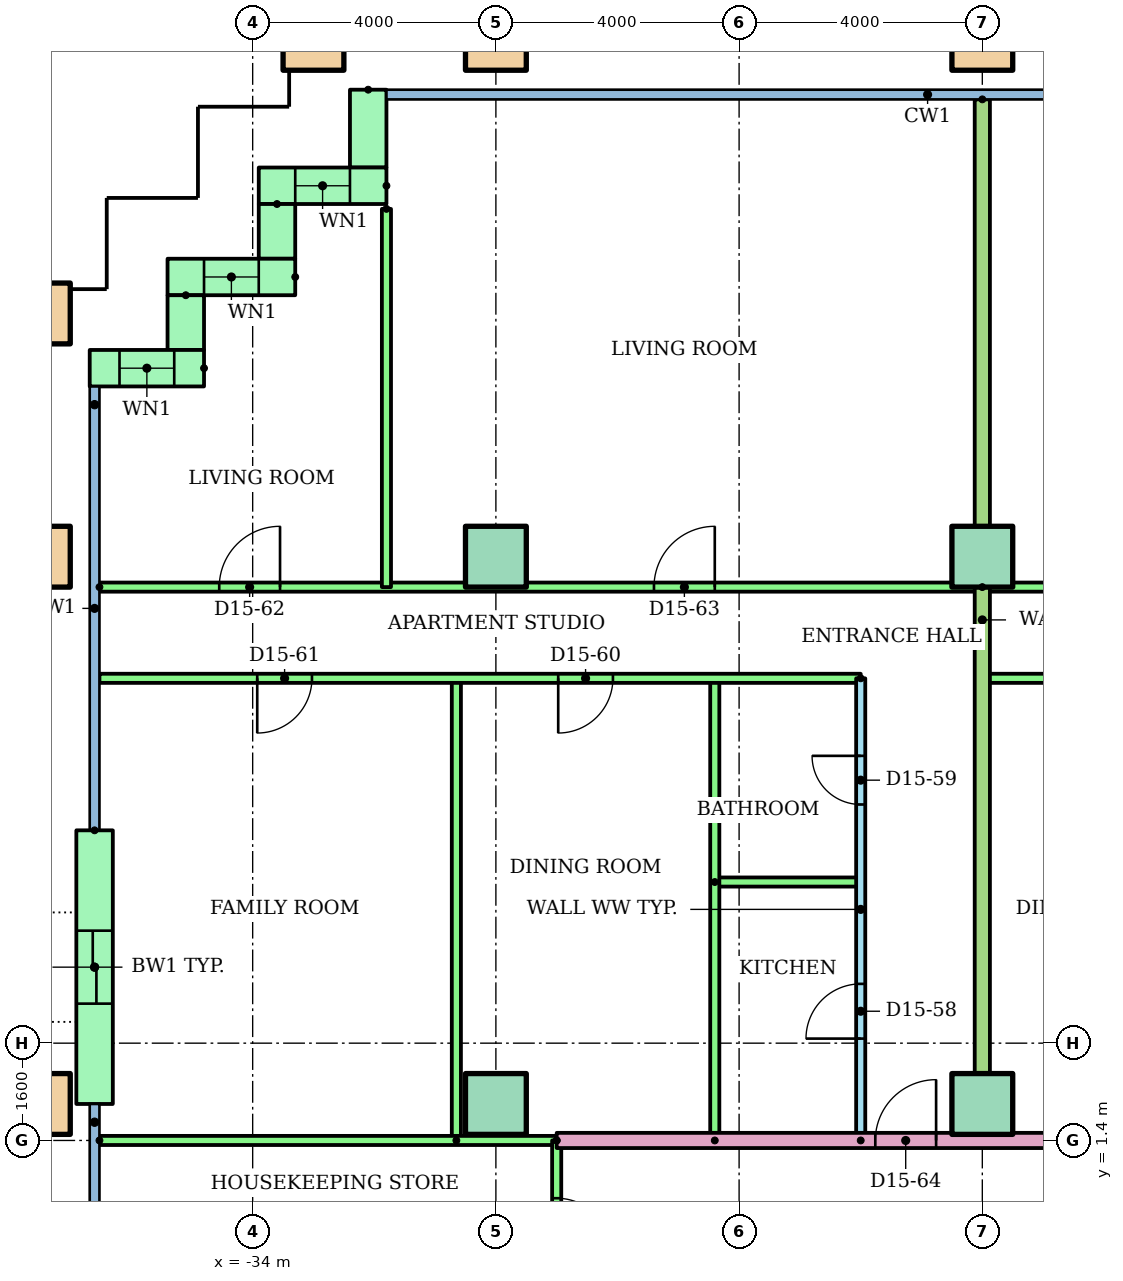
"""IFC4 building model, lengths in metres.
Left out: names, types, materials, properties, quantities, classifications, styles, units other than length and angle.
Written with IfcOpenShell. Run it as: python <this file> out.ifc"""

import sys

from ifc_helpers import new_model, si_unit, direction, frame, frame_2d, origin, origin_2d, place, context, subcontext, project, spatial, rectangle, hollow_rectangle, extrude, element, fill, save


model = new_model("IFC4")
c1 = context("Model", 3, precision=1e-05, world=origin(), true_north=direction((0.0, 1.0)))
c2 = subcontext(c1, "Body", "Model", "MODEL_VIEW")
j1 = project(units=[si_unit("LENGTHUNIT", "METRE"), si_unit("PLANEANGLEUNIT", "RADIAN")], contexts=[c1])
p1 = place(None, origin())
s1 = spatial("IfcSite", under=j1, at=p1, CompositionType="ELEMENT")
p2 = place(p1, origin())
s2 = spatial("IfcBuilding", under=s1, at=p2, CompositionType="ELEMENT")
p3 = place(p2, frame((0.0, 0.0, 57.6)))
s3 = spatial("IfcBuildingStorey", under=s2, at=p3, CompositionType="ELEMENT", Elevation=57.6)
p4 = place(p3, frame((-37.5, 2.0, 0.0)))
e1 = element("IfcColumn", 1, at=p4, inside=s3, PredefinedType="COLUMN", context=c2, shape_type="SweptSolid", body=[
    extrude(hollow_rectangle(XDim=1.0, YDim=1.0, WallThickness=0.05, at=origin_2d()), origin(), (0.0, 0.0, 1.0), 3.2),
])
for number, where in (
    (2, (-30.0, 2.0, 0.0)),
    (3, (-22.0, 2.0, 0.0)),
):
    element("IfcColumn", number, at=place(p3, frame(where)), inside=s3, PredefinedType="COLUMN", context=c2, shape_type="SweptSolid", body=[
        extrude(rectangle(XDim=1.0, YDim=1.0, at=origin_2d()), origin(), (0.0, 0.0, 1.0), 3.2),
    ])
p5 = place(p3, frame((-37.5, 11.0, 0.0)))
e4 = element("IfcColumn", 4, at=p5, inside=s3, PredefinedType="COLUMN", context=c2, shape_type="SweptSolid", body=[
    extrude(hollow_rectangle(XDim=1.0, YDim=1.0, WallThickness=0.05, at=origin_2d()), origin(), (0.0, 0.0, 1.0), 3.2),
])
for number, where in (
    (5, (-30.0, 11.0, 0.0)),
    (6, (-22.0, 11.0, 0.0)),
):
    element("IfcColumn", number, at=place(p3, frame(where)), inside=s3, PredefinedType="COLUMN", context=c2, shape_type="SweptSolid", body=[
        extrude(rectangle(XDim=1.0, YDim=1.0, at=origin_2d()), origin(), (0.0, 0.0, 1.0), 3.2),
    ])
for number, where in (
    (7, (-37.5, 15.0, 0.0)),
    (8, (-33.0, 19.5, 0.0)),
    (9, (-30.0, 19.5, 0.0)),
    (10, (-22.0, 19.5, 0.0)),
):
    element("IfcColumn", number, at=place(p3, frame(where)), inside=s3, PredefinedType="COLUMN", context=c2, shape_type="SweptSolid", body=[
        extrude(hollow_rectangle(XDim=1.0, YDim=1.0, WallThickness=0.05, at=origin_2d()), origin(), (0.0, 0.0, 1.0), 3.2),
    ])
p6 = place(p3, frame((-32.1, 18.68, 0.0), z_axis=(0.0, 0.0, 1.0), x_axis=(0.0, -1.0, 0.0)))
e11 = element("IfcWall", 11, at=p6, inside=s3, PredefinedType="STANDARD", context=c2, shape_type="SweptSolid", body=[
    extrude(rectangle(XDim=1.28, YDim=0.6, at=frame_2d((0.64, 0.0))), origin(), (0.0, 0.0, 1.0), 2.92),
])
p7 = place(p3, frame((-31.8, 17.1, 0.0), z_axis=(0.0, 0.0, 1.0), x_axis=(-1.0, 0.0, 0.0)))
e12 = element("IfcWall", 12, at=p7, inside=s3, PredefinedType="STANDARD", context=c2, shape_type="SweptSolid", body=[
    extrude(rectangle(XDim=2.1, YDim=0.6, at=frame_2d((1.05, 0.0))), origin(), (0.0, 0.0, 1.0), 2.92),
])
p8 = place(p7, frame((0.6, 0.0, 0.9)))
e13 = element("IfcOpeningElement", 13, at=p8, cuts=e12, PredefinedType="OPENING", context=c2, shape_type="SweptSolid", body=[
    extrude(rectangle(XDim=0.9, YDim=1.5, at=frame_2d((0.45, 0.75))), frame((0.0, 0.31, 0.0), z_axis=(0.0, -1.0, 0.0), x_axis=(1.0, 0.0, 0.0)), (0.0, 0.0, 1.0), 0.62),
])
p9 = place(p3, frame((-33.6, 16.8, 0.0), z_axis=(0.0, 0.0, 1.0), x_axis=(0.0, -1.0, 0.0)))
e14 = element("IfcWall", 14, at=p9, inside=s3, PredefinedType="STANDARD", context=c2, shape_type="SweptSolid", body=[
    extrude(rectangle(XDim=0.9, YDim=0.6, at=frame_2d((0.45, 0.0))), origin(), (0.0, 0.0, 1.0), 2.92),
])
p10 = place(p3, frame((-33.3, 15.6, 0.0), z_axis=(0.0, 0.0, 1.0), x_axis=(-1.0, 0.0, 0.0)))
e15 = element("IfcWall", 15, at=p10, inside=s3, PredefinedType="STANDARD", context=c2, shape_type="SweptSolid", body=[
    extrude(rectangle(XDim=2.1, YDim=0.6, at=frame_2d((1.05, 0.0))), origin(), (0.0, 0.0, 1.0), 2.92),
])
p11 = place(p10, frame((0.6, 0.0, 0.9)))
e16 = element("IfcOpeningElement", 16, at=p11, cuts=e15, PredefinedType="OPENING", context=c2, shape_type="SweptSolid", body=[
    extrude(rectangle(XDim=0.9, YDim=1.5, at=frame_2d((0.45, 0.75))), frame((0.0, 0.31, 0.0), z_axis=(0.0, -1.0, 0.0), x_axis=(1.0, 0.0, 0.0)), (0.0, 0.0, 1.0), 0.62),
])
p12 = place(p3, frame((-35.1, 15.3, 0.0), z_axis=(0.0, 0.0, 1.0), x_axis=(0.0, -1.0, 0.0)))
e17 = element("IfcWall", 17, at=p12, inside=s3, PredefinedType="STANDARD", context=c2, shape_type="SweptSolid", body=[
    extrude(rectangle(XDim=0.9, YDim=0.6, at=frame_2d((0.45, 0.0))), origin(), (0.0, 0.0, 1.0), 2.92),
])
p13 = place(p3, frame((-34.8, 14.1, 0.0), z_axis=(0.0, 0.0, 1.0), x_axis=(-1.0, 0.0, 0.0)))
e18 = element("IfcWall", 18, at=p13, inside=s3, PredefinedType="STANDARD", context=c2, shape_type="SweptSolid", body=[
    extrude(rectangle(XDim=1.88, YDim=0.6, at=frame_2d((0.94, 0.0))), origin(), (0.0, 0.0, 1.0), 2.92),
])
p14 = place(p13, frame((0.49, 0.0, 0.9)))
e19 = element("IfcOpeningElement", 19, at=p14, cuts=e18, PredefinedType="OPENING", context=c2, shape_type="SweptSolid", body=[
    extrude(rectangle(XDim=0.9, YDim=1.5, at=frame_2d((0.45, 0.75))), frame((0.0, 0.31, 0.0), z_axis=(0.0, -1.0, 0.0), x_axis=(1.0, 0.0, 0.0)), (0.0, 0.0, 1.0), 0.62),
])
p15 = place(p3, frame((-36.6, 6.5, 0.0), z_axis=(0.0, 0.0, 1.0), x_axis=(0.0, -1.0, 0.0)))
e20 = element("IfcWall", 20, at=p15, inside=s3, PredefinedType="STANDARD", context=c2, shape_type="SweptSolid", body=[
    extrude(rectangle(XDim=4.5, YDim=0.6, at=frame_2d((2.25, 0.0))), origin(), (0.0, 0.0, 1.0), 2.92),
])
p16 = place(p15, frame((1.65, 0.0, 0.0)))
e21 = element("IfcOpeningElement", 21, at=p16, cuts=e20, PredefinedType="OPENING", context=c2, shape_type="SweptSolid", body=[
    extrude(rectangle(XDim=1.2, YDim=2.1, at=frame_2d((0.6, 1.05))), frame((0.0, 0.31, 0.0), z_axis=(0.0, -1.0, 0.0), x_axis=(1.0, 0.0, 0.0)), (0.0, 0.0, 1.0), 0.62),
])
p17 = place(p3, frame((-24.0, 1.4, 0.0), z_axis=(0.0, 0.0, 1.0), x_axis=(0.0, 1.0, 0.0)))
e22 = element("IfcWall", 22, at=p17, inside=s3, PredefinedType="PARTITIONING", context=c2, shape_type="SweptSolid", body=[
    extrude(rectangle(XDim=7.6, YDim=0.15, at=frame_2d((3.8, 0.0))), origin(), (0.0, 0.0, 1.0), 2.4),
])
p18 = place(p17, frame((1.675, 0.0, 0.0)))
e23 = element("IfcOpeningElement", 23, at=p18, cuts=e22, PredefinedType="OPENING", context=c2, shape_type="SweptSolid", body=[
    extrude(rectangle(XDim=0.9, YDim=2.1, at=frame_2d((0.45, 1.05))), frame((0.0, 0.085, 0.0), z_axis=(0.0, -1.0, 0.0), x_axis=(1.0, 0.0, 0.0)), (0.0, 0.0, 1.0), 0.17),
])
p19 = place(p17, frame((5.525, 0.0, 0.0)))
e24 = element("IfcOpeningElement", 24, at=p19, cuts=e22, PredefinedType="OPENING", context=c2, shape_type="SweptSolid", body=[
    extrude(rectangle(XDim=0.8, YDim=2.1, at=frame_2d((0.4, 1.05))), frame((0.0, 0.085, 0.0), z_axis=(0.0, -1.0, 0.0), x_axis=(1.0, 0.0, 0.0)), (0.0, 0.0, 1.0), 0.17),
])
p20 = place(p3, frame((-26.4, 5.65, 0.0)))
e25 = element("IfcWall", 25, at=p20, inside=s3, PredefinedType="PARTITIONING", context=c2, shape_type="SweptSolid", body=[
    extrude(rectangle(XDim=2.4, YDim=0.15, at=frame_2d((1.2, 0.0))), origin(), (0.0, 0.0, 1.0), 2.4),
])
for number, where, z_axis, x_axis in (
    (26, (-26.4, 1.4, 0.0), (0.0, 0.0, 1.0), (0.0, 1.0, 0.0)),
    (27, (-30.65, 1.4, 0.0), (0.0, 0.0, 1.0), (0.0, 1.0, 0.0)),
):
    element("IfcWall", number, at=place(p3, frame(where, z_axis=z_axis, x_axis=x_axis)), inside=s3, PredefinedType="PARTITIONING", context=c2, shape_type="SweptSolid", body=[
        extrude(rectangle(XDim=7.6, YDim=0.15, at=frame_2d((3.8, 0.0))), origin(), (0.0, 0.0, 1.0), 2.4),
    ])
p21 = place(p3, frame((-24.0, 9.0, 0.0), z_axis=(0.0, 0.0, 1.0), x_axis=(-1.0, 0.0, 0.0)))
e28 = element("IfcWall", 28, at=p21, inside=s3, PredefinedType="PARTITIONING", context=c2, shape_type="SweptSolid", body=[
    extrude(rectangle(XDim=12.52, YDim=0.15, at=frame_2d((6.26, 0.0))), origin(), (0.0, 0.0, 1.0), 2.4),
])
p22 = place(p21, frame((4.075, 0.0, 0.0)))
e29 = element("IfcOpeningElement", 29, at=p22, cuts=e28, PredefinedType="OPENING", context=c2, shape_type="SweptSolid", body=[
    extrude(rectangle(XDim=0.9, YDim=2.1, at=frame_2d((0.45, 1.05))), frame((0.0, 0.085, 0.0), z_axis=(0.0, -1.0, 0.0), x_axis=(1.0, 0.0, 0.0)), (0.0, 0.0, 1.0), 0.17),
])
p23 = place(p21, frame((9.025, 0.0, 0.0)))
e30 = element("IfcOpeningElement", 30, at=p23, cuts=e28, PredefinedType="OPENING", context=c2, shape_type="SweptSolid", body=[
    extrude(rectangle(XDim=0.9, YDim=2.1, at=frame_2d((0.45, 1.05))), frame((0.0, 0.085, 0.0), z_axis=(0.0, -1.0, 0.0), x_axis=(1.0, 0.0, 0.0)), (0.0, 0.0, 1.0), 0.17),
])
p24 = place(p3, frame((-36.52, 10.5, 0.0)))
e31 = element("IfcWall", 31, at=p24, inside=s3, PredefinedType="PARTITIONING", context=c2, shape_type="SweptSolid", body=[
    extrude(rectangle(XDim=14.52, YDim=0.15, at=frame_2d((7.26, 0.0))), origin(), (0.0, 0.0, 1.0), 2.4),
])
p25 = place(p24, frame((1.97, 0.0, 0.0)))
e32 = element("IfcOpeningElement", 32, at=p25, cuts=e31, PredefinedType="OPENING", context=c2, shape_type="SweptSolid", body=[
    extrude(rectangle(XDim=1.0, YDim=2.1, at=frame_2d((0.5, 1.05))), frame((0.0, 0.085, 0.0), z_axis=(0.0, -1.0, 0.0), x_axis=(1.0, 0.0, 0.0)), (0.0, 0.0, 1.0), 0.17),
])
p26 = place(p24, frame((9.12, 0.0, 0.0)))
e33 = element("IfcOpeningElement", 33, at=p26, cuts=e31, PredefinedType="OPENING", context=c2, shape_type="SweptSolid", body=[
    extrude(rectangle(XDim=1.0, YDim=2.1, at=frame_2d((0.5, 1.05))), frame((0.0, 0.085, 0.0), z_axis=(0.0, -1.0, 0.0), x_axis=(1.0, 0.0, 0.0)), (0.0, 0.0, 1.0), 0.17),
])
p27 = place(p3, frame((-31.8, 16.72, 0.0), z_axis=(0.0, 0.0, 1.0), x_axis=(0.0, -1.0, 0.0)))
e34 = element("IfcWall", 34, at=p27, inside=s3, PredefinedType="PARTITIONING", context=c2, shape_type="SweptSolid", body=[
    extrude(rectangle(XDim=6.22, YDim=0.15, at=frame_2d((3.11, 0.0))), origin(), (0.0, 0.0, 1.0), 2.4),
])
p28 = place(p3, frame((-16.0, 9.0, 0.0), z_axis=(0.0, 0.0, 1.0), x_axis=(-1.0, 0.0, 0.0)))
e35 = element("IfcWall", 35, at=p28, inside=s3, PredefinedType="PARTITIONING", context=c2, shape_type="SweptSolid", body=[
    extrude(rectangle(XDim=6.0, YDim=0.15, at=frame_2d((3.0, 0.0))), origin(), (0.0, 0.0, 1.0), 2.4),
])
p29 = place(p28, frame((3.75, 0.0, 0.0)))
e36 = element("IfcOpeningElement", 36, at=p29, cuts=e35, PredefinedType="OPENING", context=c2, shape_type="SweptSolid", body=[
    extrude(rectangle(XDim=0.9, YDim=2.1, at=frame_2d((0.45, 1.05))), frame((0.0, 0.085, 0.0), z_axis=(0.0, -1.0, 0.0), x_axis=(1.0, 0.0, 0.0)), (0.0, 0.0, 1.0), 0.17),
])
p30 = place(p3, frame((-22.0, 10.5, 0.0)))
e37 = element("IfcWall", 37, at=p30, inside=s3, PredefinedType="PARTITIONING", context=c2, shape_type="SweptSolid", body=[
    extrude(rectangle(XDim=8.0, YDim=0.15, at=frame_2d((4.0, 0.0))), origin(), (0.0, 0.0, 1.0), 2.4),
])
p31 = place(p30, frame((3.5, 0.0, 0.0)))
e38 = element("IfcOpeningElement", 38, at=p31, cuts=e37, PredefinedType="OPENING", context=c2, shape_type="SweptSolid", body=[
    extrude(rectangle(XDim=1.0, YDim=2.1, at=frame_2d((0.5, 1.05))), frame((0.0, 0.085, 0.0), z_axis=(0.0, -1.0, 0.0), x_axis=(1.0, 0.0, 0.0)), (0.0, 0.0, 1.0), 0.17),
])
p32 = place(p3, frame((-22.0, 18.521, 0.0), z_axis=(0.0, 0.0, 1.0), x_axis=(0.0, -1.0, 0.0)))
e39 = element("IfcWall", 39, at=p32, inside=s3, PredefinedType="PARTITIONING", context=c2, shape_type="SweptSolid", body=[
    extrude(rectangle(XDim=17.121, YDim=0.25, at=frame_2d((8.561, 0.0))), origin(), (0.0, 0.0, 1.0), 2.4),
])
p33 = place(p3, frame((-29.0, 1.4, 0.0)))
e40 = element("IfcWall", 40, at=p33, inside=s3, PredefinedType="PARTITIONING", context=c2, shape_type="SweptSolid", body=[
    extrude(rectangle(XDim=15.0, YDim=0.25, at=frame_2d((7.5, 0.0))), origin(), (0.0, 0.0, 1.0), 2.4),
])
p34 = place(p33, frame((5.24, 0.0, 0.0)))
e41 = element("IfcOpeningElement", 41, at=p34, cuts=e40, PredefinedType="OPENING", context=c2, shape_type="SweptSolid", body=[
    extrude(rectangle(XDim=1.0, YDim=2.1, at=frame_2d((0.5, 1.05))), frame((0.0, 0.135, 0.0), z_axis=(0.0, -1.0, 0.0), x_axis=(1.0, 0.0, 0.0)), (0.0, 0.0, 1.0), 0.27),
])
p35 = place(p33, frame((13.5, 0.0, 0.0)))
e42 = element("IfcOpeningElement", 42, at=p35, cuts=e40, PredefinedType="OPENING", context=c2, shape_type="SweptSolid", body=[
    extrude(rectangle(XDim=1.0, YDim=2.1, at=frame_2d((0.5, 1.05))), frame((0.0, 0.135, 0.0), z_axis=(0.0, -1.0, 0.0), x_axis=(1.0, 0.0, 0.0)), (0.0, 0.0, 1.0), 0.27),
])
p36 = place(p3, frame((-36.52, 1.4, 0.0)))
e43 = element("IfcWall", 43, at=p36, inside=s3, PredefinedType="PARTITIONING", context=c2, shape_type="SweptSolid", body=[
    extrude(rectangle(XDim=7.52, YDim=0.15, at=frame_2d((3.76, 0.0))), origin(), (0.0, 0.0, 1.0), 2.4),
])
p37 = place(p3, frame((-29.0, 1.4, 0.0), z_axis=(0.0, 0.0, 1.0), x_axis=(0.0, -1.0, 0.0)))
e44 = element("IfcWall", 44, at=p37, inside=s3, PredefinedType="PARTITIONING", context=c2, shape_type="SweptSolid", body=[
    extrude(rectangle(XDim=2.8, YDim=0.15, at=frame_2d((1.4, 0.0))), origin(), (0.0, 0.0, 1.0), 2.4),
])
p38 = place(p37, frame((0.95, 0.0, 0.0)))
e45 = element("IfcOpeningElement", 45, at=p38, cuts=e44, PredefinedType="OPENING", context=c2, shape_type="SweptSolid", body=[
    extrude(rectangle(XDim=0.9, YDim=2.1, at=frame_2d((0.45, 1.05))), frame((0.0, 0.085, 0.0), z_axis=(0.0, -1.0, 0.0), x_axis=(1.0, 0.0, 0.0)), (0.0, 0.0, 1.0), 0.17),
])
p39 = place(p8, origin())
e46 = element("IfcWindow", 46, at=p39, inside=s3, PartitioningType="SINGLE_PANEL", PredefinedType="WINDOW", context=c2, shape_type="SweptSolid", body=[
    extrude(rectangle(XDim=0.9, YDim=1.5, at=frame_2d((0.45, 0.75))), frame((0.0, 0.03, 0.0), z_axis=(0.0, -1.0, 0.0), x_axis=(1.0, 0.0, 0.0)), (0.0, 0.0, 1.0), 0.06),
])
fill(e13, e46)
p40 = place(p11, origin())
e47 = element("IfcWindow", 47, at=p40, inside=s3, PartitioningType="SINGLE_PANEL", PredefinedType="WINDOW", context=c2, shape_type="SweptSolid", body=[
    extrude(rectangle(XDim=0.9, YDim=1.5, at=frame_2d((0.45, 0.75))), frame((0.0, 0.03, 0.0), z_axis=(0.0, -1.0, 0.0), x_axis=(1.0, 0.0, 0.0)), (0.0, 0.0, 1.0), 0.06),
])
fill(e16, e47)
p41 = place(p14, origin())
e48 = element("IfcWindow", 48, at=p41, inside=s3, PartitioningType="SINGLE_PANEL", PredefinedType="WINDOW", context=c2, shape_type="SweptSolid", body=[
    extrude(rectangle(XDim=0.9, YDim=1.5, at=frame_2d((0.45, 0.75))), frame((0.0, 0.03, 0.0), z_axis=(0.0, -1.0, 0.0), x_axis=(1.0, 0.0, 0.0)), (0.0, 0.0, 1.0), 0.06),
])
fill(e19, e48)
p42 = place(p18, origin())
e49 = element("IfcDoor", 49, at=p42, inside=s3, OperationType="SINGLE_SWING_LEFT", PredefinedType="DOOR", context=c2, shape_type="SweptSolid", body=[
    extrude(rectangle(XDim=0.9, YDim=2.1, at=frame_2d((0.45, 1.05))), frame((0.0, 0.025, 0.0), z_axis=(0.0, -1.0, 0.0), x_axis=(1.0, 0.0, 0.0)), (0.0, 0.0, 1.0), 0.05),
])
fill(e23, e49)
p43 = place(p19, origin())
e50 = element("IfcDoor", 50, at=p43, inside=s3, OperationType="SINGLE_SWING_RIGHT", PredefinedType="DOOR", context=c2, shape_type="SweptSolid", body=[
    extrude(rectangle(XDim=0.8, YDim=2.1, at=frame_2d((0.4, 1.05))), frame((0.0, 0.025, 0.0), z_axis=(0.0, -1.0, 0.0), x_axis=(1.0, 0.0, 0.0)), (0.0, 0.0, 1.0), 0.05),
])
fill(e24, e50)
p44 = place(p22, origin())
e51 = element("IfcDoor", 51, at=p44, inside=s3, OperationType="SINGLE_SWING_RIGHT", PredefinedType="DOOR", context=c2, shape_type="SweptSolid", body=[
    extrude(rectangle(XDim=0.9, YDim=2.1, at=frame_2d((0.45, 1.05))), frame((0.0, 0.025, 0.0), z_axis=(0.0, -1.0, 0.0), x_axis=(1.0, 0.0, 0.0)), (0.0, 0.0, 1.0), 0.05),
])
fill(e29, e51)
p45 = place(p23, origin())
e52 = element("IfcDoor", 52, at=p45, inside=s3, OperationType="SINGLE_SWING_RIGHT", PredefinedType="DOOR", context=c2, shape_type="SweptSolid", body=[
    extrude(rectangle(XDim=0.9, YDim=2.1, at=frame_2d((0.45, 1.05))), frame((0.0, 0.025, 0.0), z_axis=(0.0, -1.0, 0.0), x_axis=(1.0, 0.0, 0.0)), (0.0, 0.0, 1.0), 0.05),
])
fill(e30, e52)
p46 = place(p25, origin())
e53 = element("IfcDoor", 53, at=p46, inside=s3, OperationType="SINGLE_SWING_RIGHT", PredefinedType="DOOR", context=c2, shape_type="SweptSolid", body=[
    extrude(rectangle(XDim=1.0, YDim=2.1, at=frame_2d((0.5, 1.05))), frame((0.0, 0.025, 0.0), z_axis=(0.0, -1.0, 0.0), x_axis=(1.0, 0.0, 0.0)), (0.0, 0.0, 1.0), 0.05),
])
fill(e32, e53)
p47 = place(p26, origin())
e54 = element("IfcDoor", 54, at=p47, inside=s3, OperationType="SINGLE_SWING_RIGHT", PredefinedType="DOOR", context=c2, shape_type="SweptSolid", body=[
    extrude(rectangle(XDim=1.0, YDim=2.1, at=frame_2d((0.5, 1.05))), frame((0.0, 0.025, 0.0), z_axis=(0.0, -1.0, 0.0), x_axis=(1.0, 0.0, 0.0)), (0.0, 0.0, 1.0), 0.05),
])
fill(e33, e54)
p48 = place(p34, origin())
e55 = element("IfcDoor", 55, at=p48, inside=s3, OperationType="SINGLE_SWING_RIGHT", PredefinedType="DOOR", context=c2, shape_type="SweptSolid", body=[
    extrude(rectangle(XDim=1.0, YDim=2.1, at=frame_2d((0.5, 1.05))), frame((0.0, 0.025, 0.0), z_axis=(0.0, -1.0, 0.0), x_axis=(1.0, 0.0, 0.0)), (0.0, 0.0, 1.0), 0.05),
])
fill(e41, e55)
p49 = place(p38, origin())
e56 = element("IfcDoor", 56, at=p49, inside=s3, OperationType="SINGLE_SWING_RIGHT", PredefinedType="DOOR", context=c2, shape_type="SweptSolid", body=[
    extrude(rectangle(XDim=0.9, YDim=2.1, at=frame_2d((0.45, 1.05))), frame((0.0, 0.025, 0.0), z_axis=(0.0, -1.0, 0.0), x_axis=(1.0, 0.0, 0.0)), (0.0, 0.0, 1.0), 0.05),
])
fill(e45, e56)
p50 = place(p16, origin())
e57 = element("IfcDoor", 57, at=p50, inside=s3, OperationType="SLIDING_TO_LEFT", PredefinedType="DOOR", context=c2, shape_type="SweptSolid", body=[
    extrude(rectangle(XDim=1.2, YDim=2.1, at=frame_2d((0.6, 1.05))), frame((0.0, 0.025, 0.0), z_axis=(0.0, -1.0, 0.0), x_axis=(1.0, 0.0, 0.0)), (0.0, 0.0, 1.0), 0.05),
])
fill(e21, e57)
save(model, sys.argv[1])
